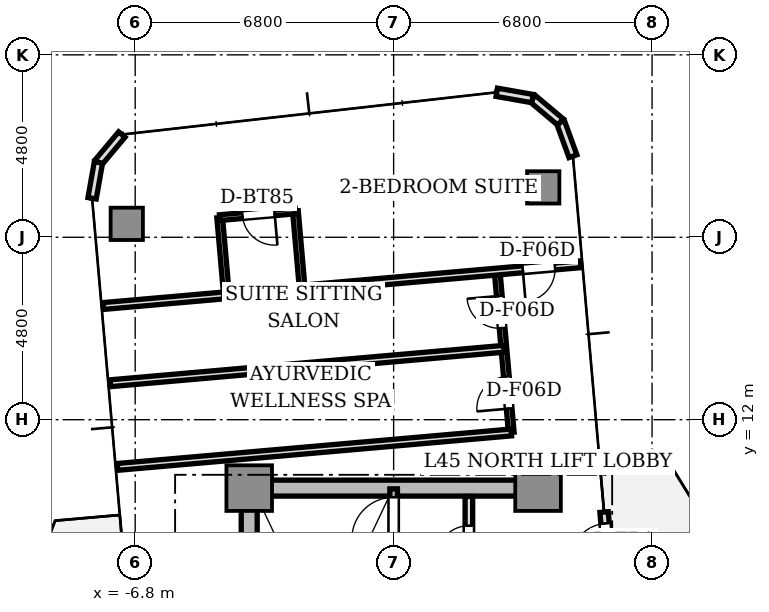
"""IFC4 building model, lengths in metres.
Left out: names, types, materials, properties, quantities, classifications, styles, units other than length and angle.
Written with IfcOpenShell. Run it as: python <this file> out.ifc"""

import sys

from ifc_helpers import new_model, si_unit, direction, frame, frame_2d, origin, origin_2d, place, context, subcontext, project, spatial, rectangle, extrude, source, transform, mapped, element, fill, save


model = new_model("IFC4")
c1 = context("Model", 3, precision=1e-05, world=origin(), true_north=direction((0.0, 1.0)))
c2 = subcontext(c1, "Body", "Model", "MODEL_VIEW")
j1 = project(units=[si_unit("LENGTHUNIT", "METRE"), si_unit("PLANEANGLEUNIT", "RADIAN")], contexts=[c1])
p1 = place(None, origin())
s1 = spatial("IfcSite", under=j1, at=p1, CompositionType="ELEMENT")
p2 = place(p1, origin())
s2 = spatial("IfcBuilding", under=s1, at=p2, CompositionType="ELEMENT")
p3 = place(p2, frame((0.0, 0.0, 164.0)))
s3 = spatial("IfcBuildingStorey", under=s2, at=p3, CompositionType="ELEMENT", Elevation=164.0)
p4 = place(p3, frame((-3.55, 10.2, 0.0), z_axis=(0.0, 0.0, 1.0), x_axis=(1.0, 0.0, 0.0)))
e1 = element("IfcWall", 1, at=p4, inside=s3, PredefinedType="SHEAR", context=c2, shape_type="SweptSolid", body=[
    extrude(rectangle(XDim=7.1, YDim=0.42, at=frame_2d((3.55, 0.0))), origin(), (0.0, 0.0, 1.0), 3.11),
])
p5 = place(p3, frame((-3.8, 2.85, 0.0), z_axis=(0.0, 0.0, 1.0), x_axis=(0.0, 1.0, 0.0)))
e2 = element("IfcWall", 2, at=p5, inside=s3, PredefinedType="SHEAR", context=c2, shape_type="SweptSolid", body=[
    extrude(rectangle(XDim=6.9, YDim=0.42, at=frame_2d((3.45, 0.0))), origin(), (0.0, 0.0, 1.0), 3.11),
])
m1 = source(origin(), c2, "Body", "SweptSolid", [
    extrude(rectangle(XDim=1.2, YDim=1.2, at=origin_2d()), origin(), (0.0, 0.0, 1.0), 3.11),
])
for number, where, z_axis, x_axis in (
    (3, (-3.8, 10.2, 0.0), (0.0, 0.0, 1.0), (1.0, 0.0, 0.0)),
    (4, (3.8, 10.2, 0.0), (0.0, 0.0, 1.0), (1.0, 0.0, 0.0)),
):
    element("IfcColumn", number, at=place(p3, frame(where, z_axis=z_axis, x_axis=x_axis)), inside=s3, PredefinedType="COLUMN", context=c2, shape_type="MappedRepresentation", body=[
        mapped(m1, transform((0.0, 0.0, 0.0), scale=1.0)),
    ])
m2 = source(origin(), c2, "Body", "SweptSolid", [
    extrude(rectangle(XDim=0.85, YDim=0.85, at=origin_2d()), origin(), (0.0, 0.0, 1.0), 3.11),
])
for number, where, z_axis, x_axis in (
    (5, (3.936, 18.112, 0.0), (0.0, 0.0, 1.0), (1.0, 0.0, 0.0)),
    (6, (-7.022, 17.153, 0.0), (0.0, 0.0, 1.0), (1.0, 0.0, 0.0)),
):
    element("IfcColumn", number, at=place(p3, frame(where, z_axis=z_axis, x_axis=x_axis)), inside=s3, PredefinedType="COLUMN", context=c2, shape_type="MappedRepresentation", body=[
        mapped(m2, transform((0.0, 0.0, 0.0), scale=1.0)),
    ])
p6 = place(p3, frame((5.772, 6.879, 0.0), z_axis=(0.0, 0.0, 1.0), x_axis=(-0.087168071984, 0.996193619346, 0.0)))
e7 = element("IfcWall", 7, at=p6, inside=s3, PredefinedType="STANDARD", context=c2, shape_type="SweptSolid", body=[
    extrude(rectangle(XDim=2.7, YDim=0.22, at=frame_2d((1.35, 0.0))), origin(), (0.0, 0.0, 1.0), 3.11),
])
p7 = place(p6, frame((1.4, 0.0, 0.0)))
e8 = element("IfcOpeningElement", 8, at=p7, cuts=e7, PredefinedType="OPENING", context=c2, shape_type="SweptSolid", body=[
    extrude(rectangle(XDim=1.0, YDim=2.2, at=frame_2d((0.5, 1.1))), frame((0.0, 0.12, 0.0), z_axis=(0.0, -1.0, 0.0), x_axis=(1.0, 0.0, 0.0)), (0.0, 0.0, 1.0), 0.24),
])
p8 = place(p3, frame((4.718, 18.933, 0.0), z_axis=(0.0, 0.0, 1.0), x_axis=(-0.34188635151, 0.939741306239, 0.0)))
e9 = element("IfcWall", 9, at=p8, inside=s3, PredefinedType="STANDARD", context=c2, shape_type="SweptSolid", body=[
    extrude(rectangle(XDim=0.958, YDim=0.22, at=frame_2d((0.479, 0.0))), origin(), (0.0, 0.0, 1.0), 3.11),
])
for number, where, z_axis, x_axis in (
    (10, (4.39, 19.833, 0.0), (0.0, 0.0, 1.0), (-0.766, 0.643, 0.0)),
    (11, (3.657, 20.449, 0.0), (0.0, 0.0, 1.0), (-0.985, 0.174, 0.0)),
):
    element("IfcWall", number, at=place(p3, frame(where, z_axis=z_axis, x_axis=x_axis)), inside=s3, PredefinedType="STANDARD", context=c2, shape_type="SweptSolid", body=[
        extrude(rectangle(XDim=0.958, YDim=0.22, at=frame_2d((0.479, 0.0))), origin(), (0.0, 0.0, 1.0), 3.11),
    ])
for number, where, z_axis, x_axis in (
    (12, (-7.152, 19.503, 0.0), (0.0, 0.0, 1.0), (-0.643, -0.766, 0.0)),
    (13, (-7.768, 18.769, 0.0), (0.0, 0.0, 1.0), (-0.174, -0.985, 0.0)),
):
    element("IfcWall", number, at=place(p3, frame(where, z_axis=z_axis, x_axis=x_axis)), inside=s3, PredefinedType="STANDARD", context=c2, shape_type="SweptSolid", body=[
        extrude(rectangle(XDim=0.958, YDim=0.22, at=frame_2d((0.479, 0.0))), origin(), (0.0, 0.0, 1.0), 3.11),
    ])
p9 = place(p3, frame((0.0, 2.5, 0.0), z_axis=(0.0, 0.0, 1.0), x_axis=(0.0, 1.0, 0.0)))
e14 = element("IfcWall", 14, at=p9, inside=s3, PredefinedType="SOLIDWALL", context=c2, shape_type="SweptSolid", body=[
    extrude(rectangle(XDim=7.68, YDim=0.2, at=frame_2d((3.84, 0.0))), origin(), (0.0, 0.0, 1.0), 3.11),
])
p10 = place(p9, frame((6.36, 0.0, 0.0)))
e15 = element("IfcOpeningElement", 15, at=p10, cuts=e14, PredefinedType="OPENING", context=c2, shape_type="SweptSolid", body=[
    extrude(rectangle(XDim=1.1, YDim=2.15, at=frame_2d((0.55, 1.075))), frame((0.0, 0.11, 0.0), z_axis=(0.0, -1.0, 0.0), x_axis=(1.0, 0.0, 0.0)), (0.0, 0.0, 1.0), 0.22),
])
p11 = place(p3, frame((1.98, 5.32, 0.0), z_axis=(0.0, 0.0, 1.0), x_axis=(0.0, 1.0, 0.0)))
e16 = element("IfcWall", 16, at=p11, inside=s3, PredefinedType="SOLIDWALL", context=c2, shape_type="SweptSolid", body=[
    extrude(rectangle(XDim=4.66, YDim=0.2, at=frame_2d((2.33, 0.0))), origin(), (0.0, 0.0, 1.0), 2.66),
])
p12 = place(p11, frame((3.04, 0.0, 0.0)))
e17 = element("IfcOpeningElement", 17, at=p12, cuts=e16, PredefinedType="OPENING", context=c2, shape_type="SweptSolid", body=[
    extrude(rectangle(XDim=0.85, YDim=2.1, at=frame_2d((0.425, 1.05))), frame((0.0, 0.11, 0.0), z_axis=(0.0, -1.0, 0.0), x_axis=(1.0, 0.0, 0.0)), (0.0, 0.0, 1.0), 0.22),
])
p13 = place(p3, frame((3.095, 11.664, 0.0), z_axis=(0.0, 0.0, 1.0), x_axis=(-0.087142722004, 0.996195837173, 0.0)))
e18 = element("IfcWall", 18, at=p13, inside=s3, PredefinedType="PARTITIONING", context=c2, shape_type="SweptSolid", body=[
    extrude(rectangle(XDim=4.25, YDim=0.15, at=frame_2d((2.125, 0.0))), origin(), (0.0, 0.0, 1.0), 2.66),
])
p14 = place(p13, frame((0.63, 0.0, 0.0)))
e19 = element("IfcOpeningElement", 19, at=p14, cuts=e18, PredefinedType="OPENING", context=c2, shape_type="SweptSolid", body=[
    extrude(rectangle(XDim=0.85, YDim=2.1, at=frame_2d((0.425, 1.05))), frame((0.0, 0.085, 0.0), z_axis=(0.0, -1.0, 0.0), x_axis=(1.0, 0.0, 0.0)), (0.0, 0.0, 1.0), 0.17),
])
p15 = place(p13, frame((2.755, 0.0, 0.0)))
e20 = element("IfcOpeningElement", 20, at=p15, cuts=e18, PredefinedType="OPENING", context=c2, shape_type="SweptSolid", body=[
    extrude(rectangle(XDim=0.85, YDim=2.1, at=frame_2d((0.425, 1.05))), frame((0.0, 0.085, 0.0), z_axis=(0.0, -1.0, 0.0), x_axis=(1.0, 0.0, 0.0)), (0.0, 0.0, 1.0), 0.17),
])
p16 = place(p3, frame((3.095, 11.664, 0.0), z_axis=(0.0, 0.0, 1.0), x_axis=(-0.996196061386, -0.087140158824, 0.0)))
e21 = element("IfcWall", 21, at=p16, inside=s3, PredefinedType="PARTITIONING", context=c2, shape_type="SweptSolid", body=[
    extrude(rectangle(XDim=10.4, YDim=0.18, at=frame_2d((5.2, 0.0))), origin(), (0.0, 0.0, 1.0), 2.66),
])
p17 = place(p3, frame((2.903, 13.866, 0.0), z_axis=(0.0, 0.0, 1.0), x_axis=(-0.996194201607, -0.087161417409, 0.0)))
e22 = element("IfcWall", 22, at=p17, inside=s3, PredefinedType="PARTITIONING", context=c2, shape_type="SweptSolid", body=[
    extrude(rectangle(XDim=10.4, YDim=0.18, at=frame_2d((5.2, 0.0))), origin(), (0.0, 0.0, 1.0), 2.66),
])
p18 = place(p3, frame((4.917, 16.09, 0.0), z_axis=(0.0, 0.0, 1.0), x_axis=(-0.996196619285, -0.087133780622, 0.0)))
e23 = element("IfcWall", 23, at=p18, inside=s3, PredefinedType="PARTITIONING", context=c2, shape_type="SweptSolid", body=[
    extrude(rectangle(XDim=12.6, YDim=0.18, at=frame_2d((6.3, 0.0))), origin(), (0.0, 0.0, 1.0), 2.66),
])
p19 = place(p18, frame((0.675, 0.0, 0.0)))
e24 = element("IfcOpeningElement", 24, at=p19, cuts=e23, PredefinedType="OPENING", context=c2, shape_type="SweptSolid", body=[
    extrude(rectangle(XDim=0.85, YDim=2.1, at=frame_2d((0.425, 1.05))), frame((0.0, 0.1, 0.0), z_axis=(0.0, -1.0, 0.0), x_axis=(1.0, 0.0, 0.0)), (0.0, 0.0, 1.0), 0.2),
])
for number, where, z_axis, x_axis in (
    (25, (-4.398, 15.275, 0.0), (0.0, 0.0, 1.0), (-0.087, 0.996, 0.0)),
    (26, (-2.406, 15.449, 0.0), (0.0, 0.0, 1.0), (-0.087, 0.996, 0.0)),
):
    element("IfcWall", number, at=place(p3, frame(where, z_axis=z_axis, x_axis=x_axis)), inside=s3, PredefinedType="PARTITIONING", context=c2, shape_type="SweptSolid", body=[
        extrude(rectangle(XDim=2.05, YDim=0.15, at=frame_2d((1.025, 0.0))), origin(), (0.0, 0.0, 1.0), 2.66),
    ])
p20 = place(p3, frame((-2.584, 17.491, 0.0), z_axis=(0.0, 0.0, 1.0), x_axis=(-0.99619464492, -0.087156350505, 0.0)))
e27 = element("IfcWall", 27, at=p20, inside=s3, PredefinedType="PARTITIONING", context=c2, shape_type="SweptSolid", body=[
    extrude(rectangle(XDim=2.0, YDim=0.15, at=frame_2d((1.0, 0.0))), origin(), (0.0, 0.0, 1.0), 2.63),
])
p21 = place(p20, frame((0.55, 0.0, 0.0)))
e28 = element("IfcOpeningElement", 28, at=p21, cuts=e27, PredefinedType="OPENING", context=c2, shape_type="SweptSolid", body=[
    extrude(rectangle(XDim=0.85, YDim=2.1, at=frame_2d((0.425, 1.05))), frame((0.0, 0.085, 0.0), z_axis=(0.0, -1.0, 0.0), x_axis=(1.0, 0.0, 0.0)), (0.0, 0.0, 1.0), 0.17),
])
m3 = source(origin(), c2, "Body", "SweptSolid", [
    extrude(rectangle(XDim=1.0, YDim=0.05, at=origin_2d()), origin(), (0.0, 0.0, 1.0), 2.2),
])
p22 = place(p7, frame((0.5, 0.0, 0.0)))
e29 = element("IfcDoor", 29, at=p22, inside=s3, OperationType="SINGLE_SWING_LEFT", PredefinedType="DOOR", context=c2, shape_type="MappedRepresentation", body=[
    mapped(m3, transform((0.0, 0.0, 0.0), scale=1.0)),
])
fill(e8, e29)
m4 = source(origin(), c2, "Body", "SweptSolid", [
    extrude(rectangle(XDim=1.1, YDim=0.05, at=origin_2d()), origin(), (0.0, 0.0, 1.0), 2.15),
])
p23 = place(p10, frame((0.55, 0.0, 0.0)))
e30 = element("IfcDoor", 30, at=p23, inside=s3, OperationType="SINGLE_SWING_LEFT", PredefinedType="DOOR", context=c2, shape_type="MappedRepresentation", body=[
    mapped(m4, transform((0.0, 0.0, 0.0), scale=1.0)),
])
fill(e15, e30)
m5 = source(origin(), c2, "Body", "SweptSolid", [
    extrude(rectangle(XDim=0.85, YDim=0.05, at=origin_2d()), origin(), (0.0, 0.0, 1.0), 2.1),
])
p24 = place(p12, frame((0.425, 0.0, 0.0)))
e31 = element("IfcDoor", 31, at=p24, inside=s3, OperationType="SINGLE_SWING_LEFT", PredefinedType="DOOR", context=c2, shape_type="MappedRepresentation", body=[
    mapped(m5, transform((0.0, 0.0, 0.0), scale=1.0)),
])
fill(e17, e31)
p25 = place(p14, frame((0.425, 0.0, 0.0)))
e32 = element("IfcDoor", 32, at=p25, inside=s3, OperationType="SINGLE_SWING_LEFT", PredefinedType="DOOR", context=c2, shape_type="MappedRepresentation", body=[
    mapped(m5, transform((0.0, 0.0, 0.0), scale=1.0)),
])
fill(e19, e32)
p26 = place(p15, frame((0.425, 0.0, 0.0)))
e33 = element("IfcDoor", 33, at=p26, inside=s3, OperationType="SINGLE_SWING_RIGHT", PredefinedType="DOOR", context=c2, shape_type="MappedRepresentation", body=[
    mapped(m5, transform((0.0, 0.0, 0.0), scale=1.0)),
])
fill(e20, e33)
p27 = place(p21, frame((0.425, 0.0, 0.0)))
e34 = element("IfcDoor", 34, at=p27, inside=s3, OperationType="SINGLE_SWING_LEFT", PredefinedType="DOOR", context=c2, shape_type="MappedRepresentation", body=[
    mapped(m5, transform((0.0, 0.0, 0.0), scale=1.0)),
])
fill(e28, e34)
p28 = place(p19, frame((0.425, 0.0, 0.0)))
e35 = element("IfcDoor", 35, at=p28, inside=s3, OperationType="SINGLE_SWING_RIGHT", PredefinedType="DOOR", context=c2, shape_type="MappedRepresentation", body=[
    mapped(m5, transform((0.0, 0.0, 0.0), scale=1.0)),
])
fill(e24, e35)
save(model, sys.argv[1])
